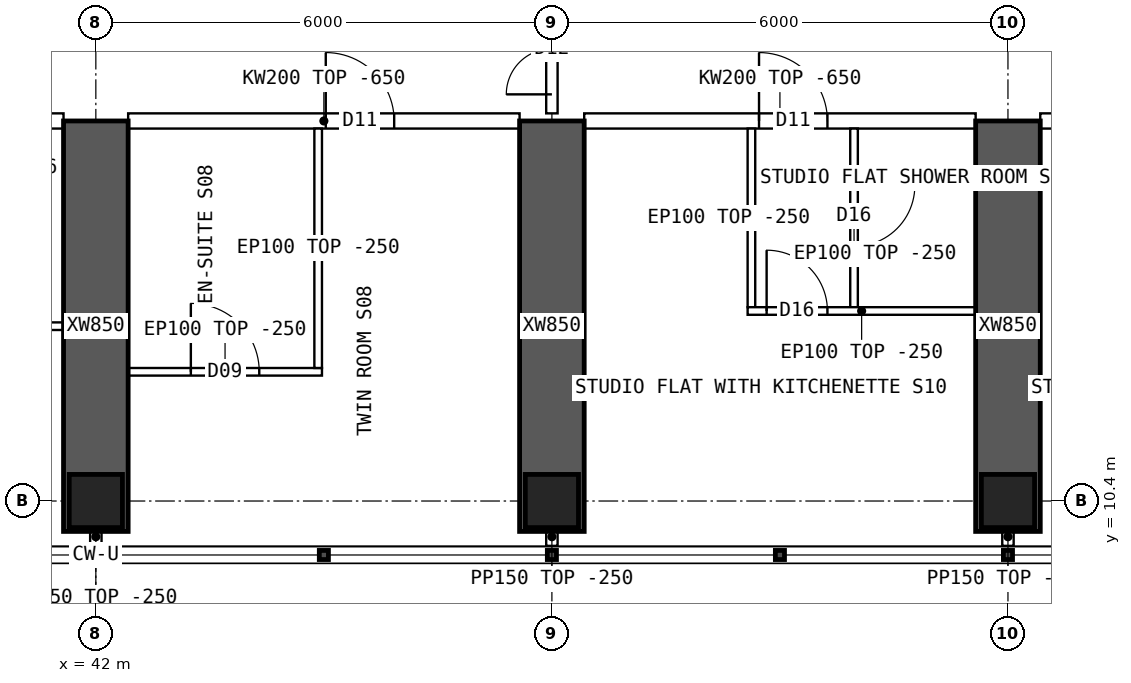
"""IFC4 building model, lengths in metres.
Left out: names, types, materials, properties, quantities, classifications, styles, units other than length and angle.
Written with IfcOpenShell. Run it as: python <this file> out.ifc"""

import sys

from ifc_helpers import new_model, si_unit, direction, frame, frame_2d, origin, origin_2d, place, context, subcontext, project, spatial, polyline, rectangle, hollow_rectangle, outline, extrude, element, fill, save


model = new_model("IFC4")
c1 = context("Model", 3, precision=1e-05, world=origin(), true_north=direction((0.0, 1.0)))
c2 = subcontext(c1, "Body", "Model", "MODEL_VIEW")
j1 = project(units=[si_unit("LENGTHUNIT", "METRE"), si_unit("PLANEANGLEUNIT", "RADIAN")], contexts=[c1])
p1 = place(None, origin())
s1 = spatial("IfcSite", under=j1, at=p1, CompositionType="ELEMENT")
p2 = place(p1, origin())
s2 = spatial("IfcBuilding", under=s1, at=p2, CompositionType="ELEMENT")
p3 = place(p2, frame((0.0, 0.0, 182.35)))
s3 = spatial("IfcBuildingStorey", under=s2, at=p3, CompositionType="ELEMENT", Elevation=182.35)
for number, where, z_axis, x_axis in (
    (1, (42.0, 10.4, 0.0), (0.0, 0.0, 1.0), (1.0, 0.0, 0.0)),
    (2, (48.0, 10.4, 0.0), (0.0, 0.0, 1.0), (1.0, 0.0, 0.0)),
    (3, (54.0, 10.4, 0.0), (0.0, 0.0, 1.0), (1.0, 0.0, 0.0)),
):
    element("IfcColumn", number, at=place(p3, frame(where, z_axis=z_axis, x_axis=x_axis)), inside=s3, PredefinedType="COLUMN", context=c2, shape_type="SweptSolid", body=[
        extrude(hollow_rectangle(XDim=0.7, YDim=0.7, WallThickness=0.07, at=origin_2d()), origin(), (0.0, 0.0, 1.0), 3.75),
    ])
for number, where, z_axis, x_axis in (
    (4, (42.0, 10.0, 0.0), (0.0, 0.0, 1.0), (0.0, 1.0, 0.0)),
    (5, (48.0, 10.0, 0.0), (0.0, 0.0, 1.0), (0.0, 1.0, 0.0)),
    (6, (54.0, 10.0, 0.0), (0.0, 0.0, 1.0), (0.0, 1.0, 0.0)),
):
    element("IfcWall", number, at=place(p3, frame(where, z_axis=z_axis, x_axis=x_axis)), inside=s3, PredefinedType="SHEAR", context=c2, shape_type="SweptSolid", body=[
        extrude(rectangle(XDim=5.4, YDim=0.85, at=frame_2d((2.7, 0.0))), origin(), (0.0, 0.0, 1.0), 3.75),
    ])
p4 = place(p3, frame((36.425, 15.4, 0.0), z_axis=(0.0, 0.0, 1.0), x_axis=(1.0, 0.0, 0.0)))
e7 = element("IfcWall", 7, at=p4, inside=s3, PredefinedType="SOLIDWALL", context=c2, shape_type="SweptSolid", body=[
    extrude(outline(polyline([(0.0, 0.0), (5.15, 0.0), (5.15, 3.1), (0.0, 3.1), (0.0, 0.0)])), frame((0.0, 0.1, 0.0), z_axis=(0.0, -1.0, 0.0), x_axis=(1.0, 0.0, 0.0)), (0.0, 0.0, 1.0), 0.2),
])
p5 = place(p4, frame((0.3, 0.0, 0.0)))
e8 = element("IfcOpeningElement", 8, at=p5, cuts=e7, PredefinedType="OPENING", context=c2, shape_type="SweptSolid", body=[
    extrude(rectangle(XDim=1.0, YDim=2.1, at=frame_2d((0.5, 1.05))), frame((0.0, 0.11, 0.0), z_axis=(0.0, -1.0, 0.0), x_axis=(1.0, 0.0, 0.0)), (0.0, 0.0, 1.0), 0.22),
])
p6 = place(p3, frame((42.425, 15.4, 0.0), z_axis=(0.0, 0.0, 1.0), x_axis=(1.0, 0.0, 0.0)))
e9 = element("IfcWall", 9, at=p6, inside=s3, PredefinedType="SOLIDWALL", context=c2, shape_type="SweptSolid", body=[
    extrude(outline(polyline([(0.0, 0.0), (5.15, 0.0), (5.15, 3.1), (0.0, 3.1), (0.0, 0.0)])), frame((0.0, 0.1, 0.0), z_axis=(0.0, -1.0, 0.0), x_axis=(1.0, 0.0, 0.0)), (0.0, 0.0, 1.0), 0.2),
])
p7 = place(p6, frame((2.6, 0.0, 0.0)))
e10 = element("IfcOpeningElement", 10, at=p7, cuts=e9, PredefinedType="OPENING", context=c2, shape_type="SweptSolid", body=[
    extrude(rectangle(XDim=0.9, YDim=2.1, at=frame_2d((0.45, 1.05))), frame((0.0, 0.11, 0.0), z_axis=(0.0, -1.0, 0.0), x_axis=(1.0, 0.0, 0.0)), (0.0, 0.0, 1.0), 0.22),
])
p8 = place(p3, frame((48.425, 15.4, 0.0), z_axis=(0.0, 0.0, 1.0), x_axis=(1.0, 0.0, 0.0)))
e11 = element("IfcWall", 11, at=p8, inside=s3, PredefinedType="SOLIDWALL", context=c2, shape_type="SweptSolid", body=[
    extrude(outline(polyline([(0.0, 0.0), (5.15, 0.0), (5.15, 3.1), (0.0, 3.1), (0.0, 0.0)])), frame((0.0, 0.1, 0.0), z_axis=(0.0, -1.0, 0.0), x_axis=(1.0, 0.0, 0.0)), (0.0, 0.0, 1.0), 0.2),
])
p9 = place(p8, frame((2.3, 0.0, 0.0)))
e12 = element("IfcOpeningElement", 12, at=p9, cuts=e11, PredefinedType="OPENING", context=c2, shape_type="SweptSolid", body=[
    extrude(rectangle(XDim=0.9, YDim=2.1, at=frame_2d((0.45, 1.05))), frame((0.0, 0.11, 0.0), z_axis=(0.0, -1.0, 0.0), x_axis=(1.0, 0.0, 0.0)), (0.0, 0.0, 1.0), 0.22),
])
p10 = place(p3, frame((54.425, 15.4, 0.0), z_axis=(0.0, 0.0, 1.0), x_axis=(1.0, 0.0, 0.0)))
e13 = element("IfcWall", 13, at=p10, inside=s3, PredefinedType="SOLIDWALL", context=c2, shape_type="SweptSolid", body=[
    extrude(outline(polyline([(0.0, 0.0), (5.15, 0.0), (5.15, 3.1), (0.0, 3.1), (0.0, 0.0)])), frame((0.0, 0.1, 0.0), z_axis=(0.0, -1.0, 0.0), x_axis=(1.0, 0.0, 0.0)), (0.0, 0.0, 1.0), 0.2),
])
p11 = place(p10, frame((2.3, 0.0, 0.0)))
e14 = element("IfcOpeningElement", 14, at=p11, cuts=e13, PredefinedType="OPENING", context=c2, shape_type="SweptSolid", body=[
    extrude(rectangle(XDim=0.9, YDim=2.1, at=frame_2d((0.45, 1.05))), frame((0.0, 0.11, 0.0), z_axis=(0.0, -1.0, 0.0), x_axis=(1.0, 0.0, 0.0)), (0.0, 0.0, 1.0), 0.22),
])
p12 = place(p3, frame((38.925, 12.7, 0.0), z_axis=(0.0, 0.0, 1.0), x_axis=(1.0, 0.0, 0.0)))
e15 = element("IfcWall", 15, at=p12, inside=s3, PredefinedType="PARTITIONING", context=c2, shape_type="SweptSolid", body=[
    extrude(rectangle(XDim=2.65, YDim=0.1, at=frame_2d((1.325, 0.0))), origin(), (0.0, 0.0, 1.0), 3.5),
])
p13 = place(p3, frame((44.975, 12.1, 0.0), z_axis=(0.0, 0.0, 1.0), x_axis=(-1.0, 0.0, 0.0)))
e16 = element("IfcWall", 16, at=p13, inside=s3, PredefinedType="PARTITIONING", context=c2, shape_type="SweptSolid", body=[
    extrude(rectangle(XDim=2.55, YDim=0.1, at=frame_2d((1.275, 0.0))), origin(), (0.0, 0.0, 1.0), 3.5),
])
p14 = place(p13, frame((0.825, 0.0, 0.0)))
e17 = element("IfcOpeningElement", 17, at=p14, cuts=e16, PredefinedType="OPENING", context=c2, shape_type="SweptSolid", body=[
    extrude(rectangle(XDim=0.9, YDim=2.1, at=frame_2d((0.45, 1.05))), frame((0.0, 0.06, 0.0), z_axis=(0.0, -1.0, 0.0), x_axis=(1.0, 0.0, 0.0)), (0.0, 0.0, 1.0), 0.12),
])
p15 = place(p3, frame((44.925, 12.15, 0.0), z_axis=(0.0, 0.0, 1.0), x_axis=(0.0, 1.0, 0.0)))
e18 = element("IfcWall", 18, at=p15, inside=s3, PredefinedType="PARTITIONING", context=c2, shape_type="SweptSolid", body=[
    extrude(outline(polyline([(0.0, 0.0), (3.15, 0.0), (3.15, 3.1), (3.102, 3.1), (3.1, 3.5), (0.0, 3.5), (0.0, 0.0)])), frame((0.0, 0.05, 0.0), z_axis=(0.0, -1.0, 0.0), x_axis=(1.0, 0.0, 0.0)), (0.0, 0.0, 1.0), 0.1),
])
p16 = place(p3, frame((53.575, 12.9, 0.0), z_axis=(0.0, 0.0, 1.0), x_axis=(-1.0, 0.0, 0.0)))
e19 = element("IfcWall", 19, at=p16, inside=s3, PredefinedType="PARTITIONING", context=c2, shape_type="SweptSolid", body=[
    extrude(rectangle(XDim=3.0, YDim=0.1, at=frame_2d((1.5, 0.0))), origin(), (0.0, 0.0, 1.0), 3.5),
])
p17 = place(p16, frame((1.95, 0.0, 0.0)))
e20 = element("IfcOpeningElement", 20, at=p17, cuts=e19, PredefinedType="OPENING", context=c2, shape_type="SweptSolid", body=[
    extrude(rectangle(XDim=0.8, YDim=2.1, at=frame_2d((0.4, 1.05))), frame((0.0, 0.06, 0.0), z_axis=(0.0, -1.0, 0.0), x_axis=(1.0, 0.0, 0.0)), (0.0, 0.0, 1.0), 0.12),
])
p18 = place(p3, frame((50.625, 12.95, 0.0), z_axis=(0.0, 0.0, 1.0), x_axis=(0.0, 1.0, 0.0)))
e21 = element("IfcWall", 21, at=p18, inside=s3, PredefinedType="PARTITIONING", context=c2, shape_type="SweptSolid", body=[
    extrude(outline(polyline([(0.0, 0.0), (2.35, 0.0), (2.35, 3.1), (2.302, 3.1), (2.3, 3.5), (0.0, 3.5), (0.0, 0.0)])), frame((0.0, 0.05, 0.0), z_axis=(0.0, -1.0, 0.0), x_axis=(1.0, 0.0, 0.0)), (0.0, 0.0, 1.0), 0.1),
])
p19 = place(p3, frame((51.975, 12.95, 0.0), z_axis=(0.0, 0.0, 1.0), x_axis=(0.0, 1.0, 0.0)))
e22 = element("IfcWall", 22, at=p19, inside=s3, PredefinedType="PARTITIONING", context=c2, shape_type="SweptSolid", body=[
    extrude(outline(polyline([(0.0, 0.0), (2.35, 0.0), (2.35, 3.1), (2.302, 3.1), (2.3, 3.5), (0.0, 3.5), (0.0, 0.0)])), frame((0.0, 0.05, 0.0), z_axis=(0.0, -1.0, 0.0), x_axis=(1.0, 0.0, 0.0)), (0.0, 0.0, 1.0), 0.1),
])
p20 = place(p19, frame((0.8, 0.0, 0.0)))
e23 = element("IfcOpeningElement", 23, at=p20, cuts=e22, PredefinedType="OPENING", context=c2, shape_type="SweptSolid", body=[
    extrude(rectangle(XDim=0.8, YDim=2.1, at=frame_2d((0.4, 1.05))), frame((0.0, 0.06, 0.0), z_axis=(0.0, -1.0, 0.0), x_axis=(1.0, 0.0, 0.0)), (0.0, 0.0, 1.0), 0.12),
])
p21 = place(p3, frame((48.0, 15.5, 0.0), z_axis=(0.0, 0.0, 1.0), x_axis=(0.0, 1.0, 0.0)))
e24 = element("IfcWall", 24, at=p21, inside=s3, PredefinedType="PARTITIONING", context=c2, shape_type="SweptSolid", body=[
    extrude(outline(polyline([(0.0, 0.0), (1.7, 0.0), (1.7, 3.1), (0.0, 3.1), (0.0, 0.0)])), frame((0.0, 0.075, 0.0), z_axis=(0.0, -1.0, 0.0), x_axis=(1.0, 0.0, 0.0)), (0.0, 0.0, 1.0), 0.15),
])
p22 = place(p21, frame((0.25, 0.0, 0.0)))
e25 = element("IfcOpeningElement", 25, at=p22, cuts=e24, PredefinedType="OPENING", context=c2, shape_type="SweptSolid", body=[
    extrude(rectangle(XDim=1.2, YDim=2.1, at=frame_2d((0.6, 1.05))), frame((0.0, 0.085, 0.0), z_axis=(0.0, -1.0, 0.0), x_axis=(1.0, 0.0, 0.0)), (0.0, 0.0, 1.0), 0.17),
])
for number, where, z_axis, x_axis in (
    (26, (42.0, 10.05, 0.0), (0.0, 0.0, 1.0), (0.0, -1.0, 0.0)),
    (27, (48.0, 10.05, 0.0), (0.0, 0.0, 1.0), (0.0, -1.0, 0.0)),
    (28, (54.0, 10.05, 0.0), (0.0, 0.0, 1.0), (0.0, -1.0, 0.0)),
):
    element("IfcWall", number, at=place(p3, frame(where, z_axis=z_axis, x_axis=x_axis)), inside=s3, PredefinedType="PARTITIONING", context=c2, shape_type="SweptSolid", body=[
        extrude(rectangle(XDim=0.24, YDim=0.15, at=frame_2d((0.12, 0.0))), origin(), (0.0, 0.0, 1.0), 3.5),
    ])
p23 = place(p14, origin())
e29 = element("IfcDoor", 29, at=p23, inside=s3, OperationType="SINGLE_SWING_RIGHT", PredefinedType="DOOR", context=c2, shape_type="SweptSolid", body=[
    extrude(rectangle(XDim=0.9, YDim=2.1, at=frame_2d((0.45, 1.05))), frame((0.0, 0.025, 0.0), z_axis=(0.0, -1.0, 0.0), x_axis=(1.0, 0.0, 0.0)), (0.0, 0.0, 1.0), 0.05),
])
fill(e17, e29)
p24 = place(p7, origin())
e30 = element("IfcDoor", 30, at=p24, inside=s3, OperationType="SINGLE_SWING_LEFT", PredefinedType="DOOR", context=c2, shape_type="SweptSolid", body=[
    extrude(rectangle(XDim=0.9, YDim=2.1, at=frame_2d((0.45, 1.05))), frame((0.0, 0.025, 0.0), z_axis=(0.0, -1.0, 0.0), x_axis=(1.0, 0.0, 0.0)), (0.0, 0.0, 1.0), 0.05),
])
fill(e10, e30)
p25 = place(p17, origin())
e31 = element("IfcDoor", 31, at=p25, inside=s3, OperationType="SINGLE_SWING_RIGHT", PredefinedType="DOOR", context=c2, shape_type="SweptSolid", body=[
    extrude(rectangle(XDim=0.8, YDim=2.1, at=frame_2d((0.4, 1.05))), frame((0.0, 0.025, 0.0), z_axis=(0.0, -1.0, 0.0), x_axis=(1.0, 0.0, 0.0)), (0.0, 0.0, 1.0), 0.05),
])
fill(e20, e31)
p26 = place(p20, origin())
e32 = element("IfcDoor", 32, at=p26, inside=s3, OperationType="SINGLE_SWING_RIGHT", PredefinedType="DOOR", context=c2, shape_type="SweptSolid", body=[
    extrude(rectangle(XDim=0.8, YDim=2.1, at=frame_2d((0.4, 1.05))), frame((0.0, 0.025, 0.0), z_axis=(0.0, -1.0, 0.0), x_axis=(1.0, 0.0, 0.0)), (0.0, 0.0, 1.0), 0.05),
])
fill(e23, e32)
p27 = place(p9, origin())
e33 = element("IfcDoor", 33, at=p27, inside=s3, OperationType="SINGLE_SWING_LEFT", PredefinedType="DOOR", context=c2, shape_type="SweptSolid", body=[
    extrude(rectangle(XDim=0.9, YDim=2.1, at=frame_2d((0.45, 1.05))), frame((0.0, 0.025, 0.0), z_axis=(0.0, -1.0, 0.0), x_axis=(1.0, 0.0, 0.0)), (0.0, 0.0, 1.0), 0.05),
])
fill(e12, e33)
p28 = place(p22, origin())
e34 = element("IfcDoor", 34, at=p28, inside=s3, OperationType="DOUBLE_DOOR_SINGLE_SWING", PredefinedType="DOOR", context=c2, shape_type="SweptSolid", body=[
    extrude(rectangle(XDim=1.2, YDim=2.1, at=frame_2d((0.6, 1.05))), frame((0.0, 0.025, 0.0), z_axis=(0.0, -1.0, 0.0), x_axis=(1.0, 0.0, 0.0)), (0.0, 0.0, 1.0), 0.05),
])
fill(e25, e34)
save(model, sys.argv[1])
